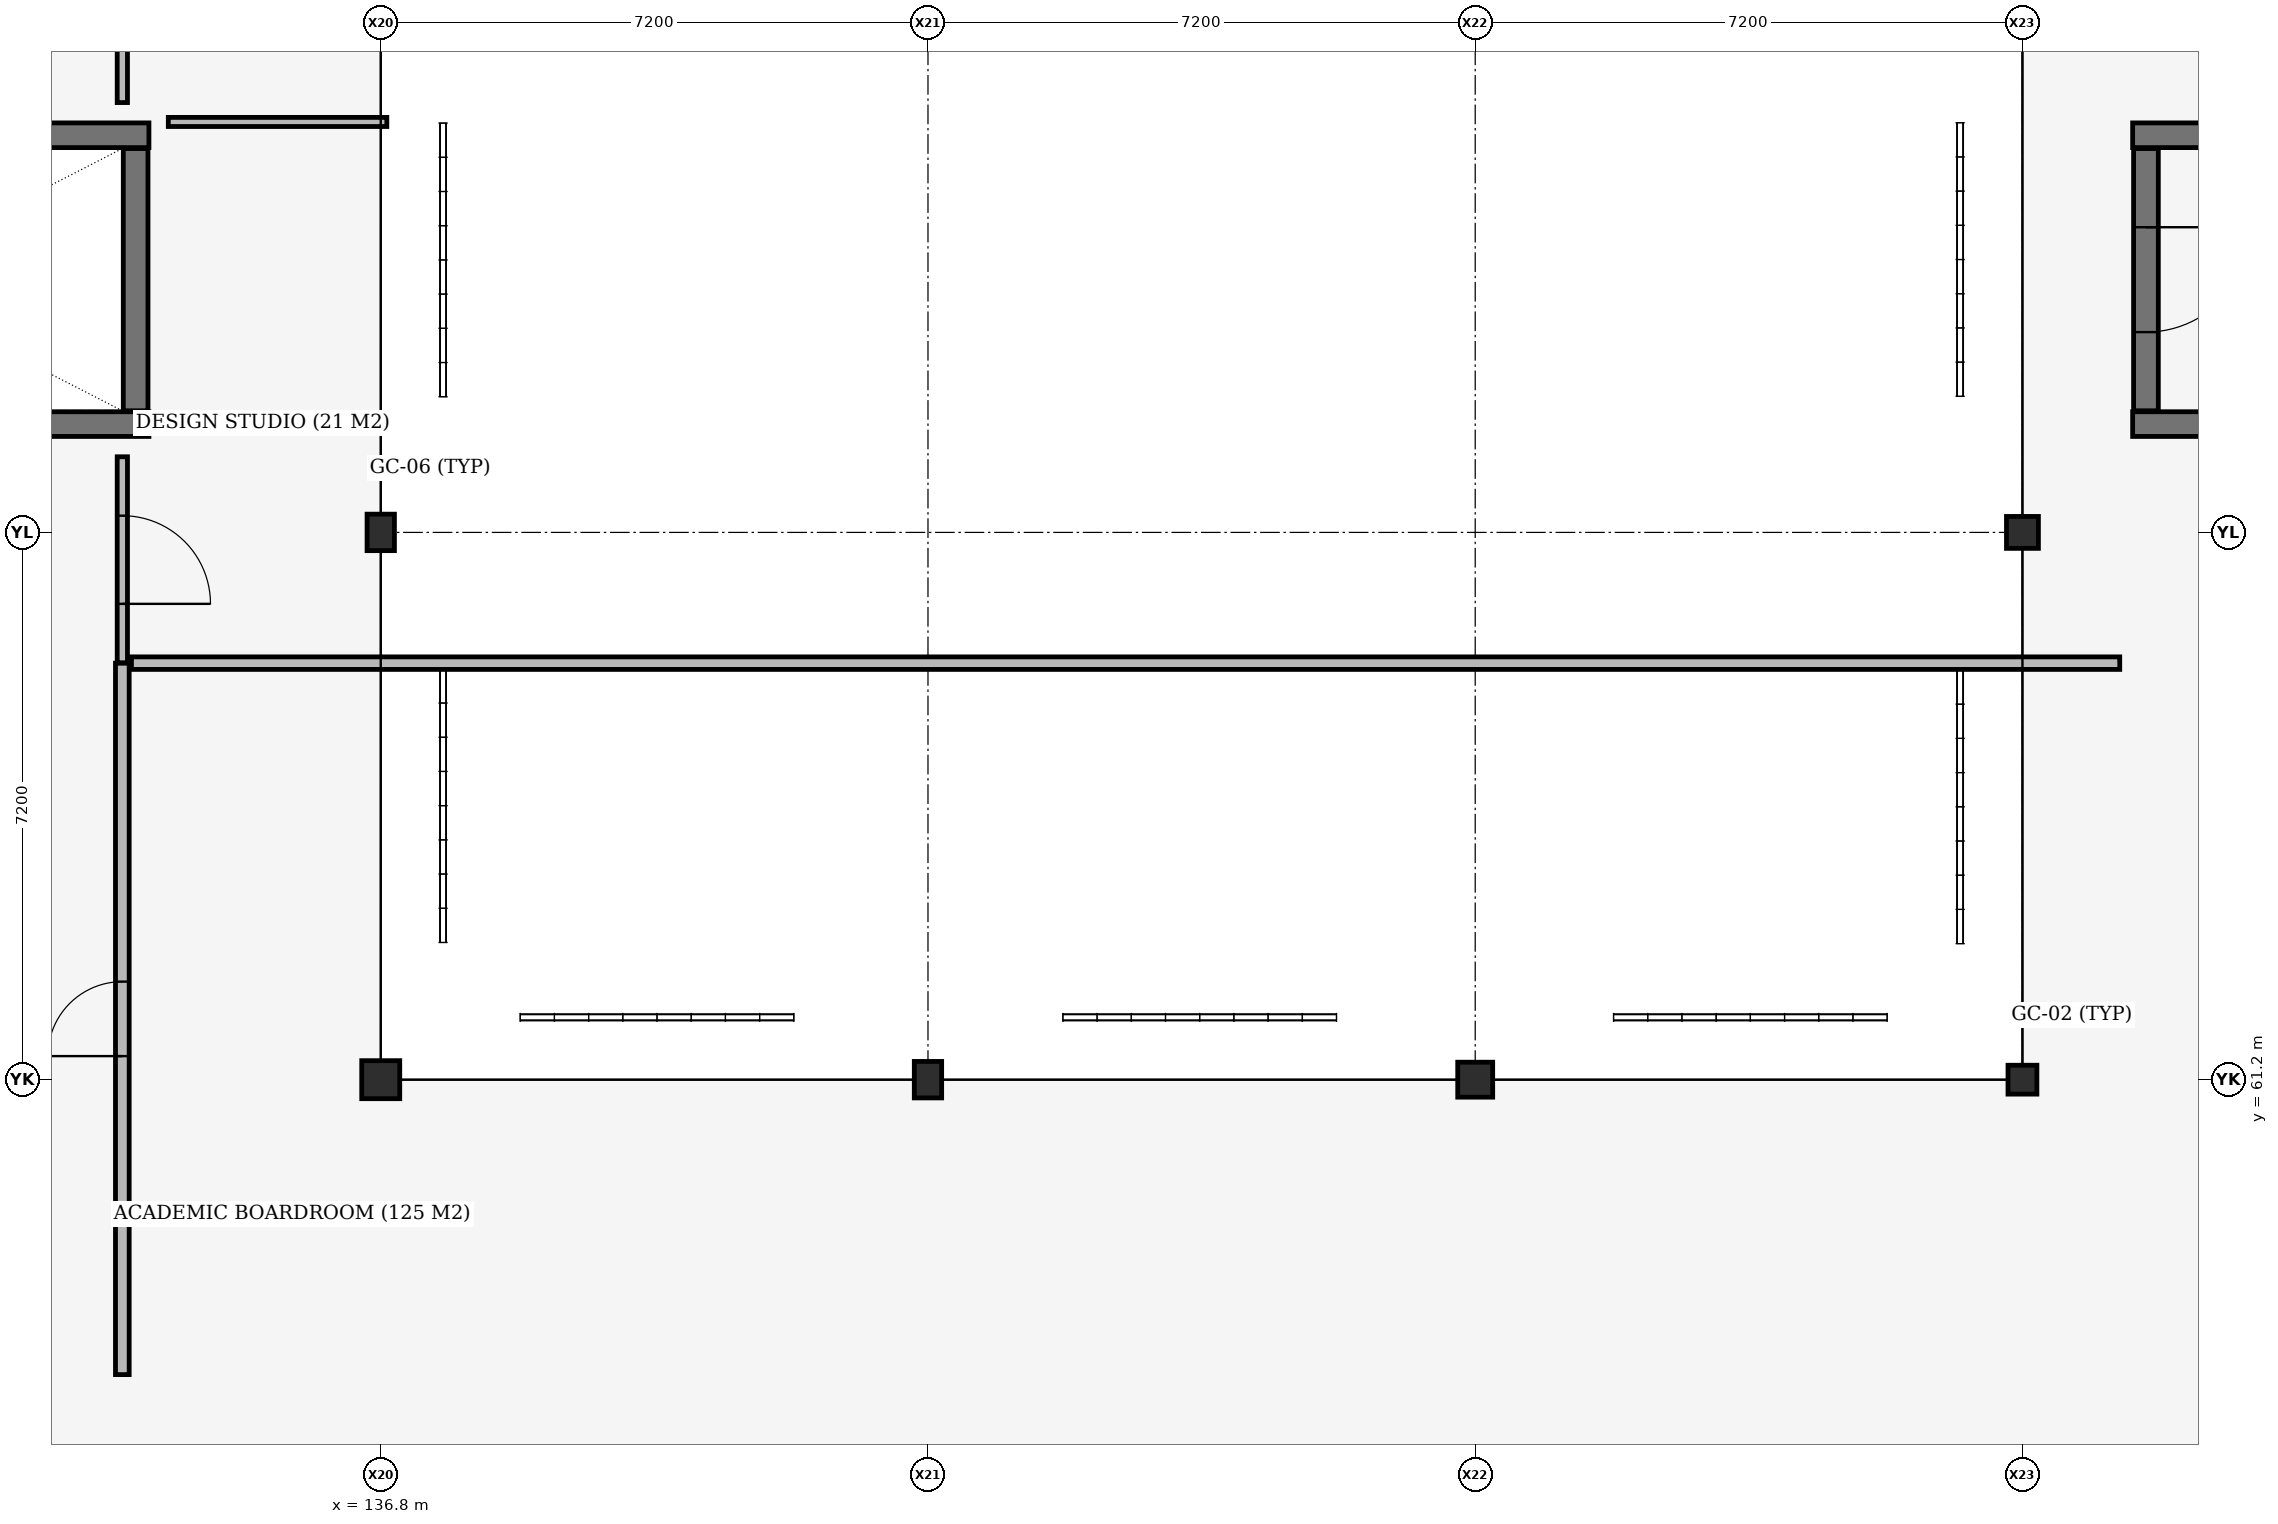
"""IFC4 building model, lengths in metres.
Left out: names, types, materials, properties, quantities, classifications, styles, units other than length and angle.
Written with IfcOpenShell. Run it as: python <this file> out.ifc"""

import sys

from ifc_helpers import new_model, si_unit, direction, frame, frame_2d, origin, origin_2d, place, context, subcontext, project, spatial, rectangle, extrude, element, fill, save


model = new_model("IFC4")
c1 = context("Model", 3, precision=1e-05, world=origin(), true_north=direction((0.0, 1.0)))
c2 = subcontext(c1, "Body", "Model", "MODEL_VIEW")
j1 = project(units=[si_unit("LENGTHUNIT", "METRE"), si_unit("PLANEANGLEUNIT", "RADIAN")], contexts=[c1])
p1 = place(None, origin())
s1 = spatial("IfcSite", under=j1, at=p1, CompositionType="ELEMENT")
p2 = place(p1, origin())
s2 = spatial("IfcBuilding", under=s1, at=p2, CompositionType="ELEMENT")
p3 = place(p2, frame((0.0, 0.0, 13.8)))
s3 = spatial("IfcBuildingStorey", under=s2, at=p3, CompositionType="ELEMENT", Elevation=13.8)
p4 = place(p3, frame((136.8, 61.2, 0.0), z_axis=(0.0, 0.0, 1.0), x_axis=(1.0, 0.0, 0.0)))
e1 = element("IfcColumn", 1, at=p4, inside=s3, PredefinedType="COLUMN", context=c2, shape_type="SweptSolid", body=[
    extrude(rectangle(XDim=0.5, YDim=0.5, at=origin_2d()), origin(), (0.0, 0.0, 1.0), 3.96),
])
p5 = place(p3, frame((136.8, 68.4, 0.0), z_axis=(0.0, 0.0, 1.0), x_axis=(1.0, 0.0, 0.0)))
e2 = element("IfcColumn", 2, at=p5, inside=s3, PredefinedType="COLUMN", context=c2, shape_type="SweptSolid", body=[
    extrude(rectangle(XDim=0.36, YDim=0.48, at=origin_2d()), origin(), (0.0, 0.0, 1.0), 3.935),
])
p6 = place(p3, frame((144.0, 61.2, 0.0), z_axis=(0.0, 0.0, 1.0), x_axis=(1.0, 0.0, 0.0)))
e3 = element("IfcColumn", 3, at=p6, inside=s3, PredefinedType="COLUMN", context=c2, shape_type="SweptSolid", body=[
    extrude(rectangle(XDim=0.36, YDim=0.48, at=origin_2d()), origin(), (0.0, 0.0, 1.0), 3.96),
])
p7 = place(p3, frame((151.2, 61.2, 0.0), z_axis=(0.0, 0.0, 1.0), x_axis=(1.0, 0.0, 0.0)))
e4 = element("IfcColumn", 4, at=p7, inside=s3, PredefinedType="COLUMN", context=c2, shape_type="SweptSolid", body=[
    extrude(rectangle(XDim=0.46, YDim=0.46, at=origin_2d()), origin(), (0.0, 0.0, 1.0), 3.96),
])
p8 = place(p3, frame((158.4, 61.2, 0.0), z_axis=(0.0, 0.0, 1.0), x_axis=(1.0, 0.0, 0.0)))
e5 = element("IfcColumn", 5, at=p8, inside=s3, PredefinedType="COLUMN", context=c2, shape_type="SweptSolid", body=[
    extrude(rectangle(XDim=0.38, YDim=0.38, at=origin_2d()), origin(), (0.0, 0.0, 1.0), 3.96),
])
p9 = place(p3, frame((158.4, 68.4, 0.0), z_axis=(0.0, 0.0, 1.0), x_axis=(1.0, 0.0, 0.0)))
e6 = element("IfcColumn", 6, at=p9, inside=s3, PredefinedType="COLUMN", context=c2, shape_type="SweptSolid", body=[
    extrude(rectangle(XDim=0.42, YDim=0.42, at=origin_2d()), origin(), (0.0, 0.0, 1.0), 3.935),
])
for number, where, z_axis, x_axis in (
    (7, (124.65, 69.825, 0.0), (0.0, 0.0, 1.0), (1.0, 0.0, 0.0)),
    (8, (133.75, 73.625, 0.0), (0.0, 0.0, 1.0), (-1.0, 0.0, 0.0)),
):
    element("IfcWall", number, at=place(p3, frame(where, z_axis=z_axis, x_axis=x_axis)), inside=s3, PredefinedType="SHEAR", context=c2, shape_type="SweptSolid", body=[
        extrude(rectangle(XDim=9.1, YDim=0.325, at=frame_2d((4.55, 0.0))), origin(), (0.0, 0.0, 1.0), 3.935),
    ])
p10 = place(p3, frame((133.575, 70.0, 0.0), z_axis=(0.0, 0.0, 1.0), x_axis=(0.0, 1.0, 0.0)))
e9 = element("IfcWall", 9, at=p10, inside=s3, PredefinedType="SHEAR", context=c2, shape_type="SweptSolid", body=[
    extrude(rectangle(XDim=3.45, YDim=0.325, at=frame_2d((1.725, 0.0))), origin(), (0.0, 0.0, 1.0), 3.935),
])
for number, where, z_axis, x_axis in (
    (10, (159.85, 69.825, 0.0), (0.0, 0.0, 1.0), (1.0, 0.0, 0.0)),
    (11, (168.95, 73.625, 0.0), (0.0, 0.0, 1.0), (-1.0, 0.0, 0.0)),
):
    element("IfcWall", number, at=place(p3, frame(where, z_axis=z_axis, x_axis=x_axis)), inside=s3, PredefinedType="SHEAR", context=c2, shape_type="SweptSolid", body=[
        extrude(rectangle(XDim=9.1, YDim=0.325, at=frame_2d((4.55, 0.0))), origin(), (0.0, 0.0, 1.0), 3.935),
    ])
p11 = place(p3, frame((160.025, 73.45, 0.0), z_axis=(0.0, 0.0, 1.0), x_axis=(0.0, -1.0, 0.0)))
e12 = element("IfcWall", 12, at=p11, inside=s3, PredefinedType="SHEAR", context=c2, shape_type="SweptSolid", body=[
    extrude(rectangle(XDim=3.45, YDim=0.325, at=frame_2d((1.725, 0.0))), origin(), (0.0, 0.0, 1.0), 3.935),
])
p12 = place(p11, frame((1.035, 0.0, 0.0)))
e13 = element("IfcOpeningElement", 13, at=p12, cuts=e12, PredefinedType="OPENING", context=c2, shape_type="SweptSolid", body=[
    extrude(rectangle(XDim=1.38, YDim=2.2, at=frame_2d((0.69, 1.1))), frame((0.0, 0.172, 0.0), z_axis=(0.0, -1.0, 0.0), x_axis=(1.0, 0.0, 0.0)), (0.0, 0.0, 1.0), 0.345),
])
p13 = place(p3, frame((133.4, 57.32, 0.0), z_axis=(0.0, 0.0, 1.0), x_axis=(0.0, 1.0, 0.0)))
e14 = element("IfcWall", 14, at=p13, inside=s3, PredefinedType="PARTITIONING", context=c2, shape_type="SweptSolid", body=[
    extrude(rectangle(XDim=9.36, YDim=0.18, at=frame_2d((4.68, 0.0))), origin(), (0.0, 0.0, 1.0), 3.935),
])
p14 = place(p13, frame((4.19, 0.0, 0.0)))
e15 = element("IfcOpeningElement", 15, at=p14, cuts=e14, PredefinedType="OPENING", context=c2, shape_type="SweptSolid", body=[
    extrude(rectangle(XDim=0.98, YDim=2.18, at=frame_2d((0.49, 1.09))), frame((0.0, 0.1, 0.0), z_axis=(0.0, -1.0, 0.0), x_axis=(1.0, 0.0, 0.0)), (0.0, 0.0, 1.0), 0.2),
])
p15 = place(p3, frame((133.52, 66.68, 0.0), z_axis=(0.0, 0.0, 1.0), x_axis=(1.0, 0.0, 0.0)))
e16 = element("IfcWall", 16, at=p15, inside=s3, PredefinedType="PARTITIONING", context=c2, shape_type="SweptSolid", body=[
    extrude(rectangle(XDim=26.16, YDim=0.165, at=frame_2d((13.08, 0.0))), origin(), (0.0, 0.0, 1.0), 3.935),
])
p16 = place(p3, frame((133.4, 66.685, 0.0), z_axis=(0.0, 0.0, 1.0), x_axis=(0.0, 1.0, 0.0)))
e17 = element("IfcWall", 17, at=p16, inside=s3, PredefinedType="PARTITIONING", context=c2, shape_type="SweptSolid", body=[
    extrude(rectangle(XDim=2.71, YDim=0.135, at=frame_2d((1.355, 0.0))), origin(), (0.0, 0.0, 1.0), 3.255),
])
p17 = place(p16, frame((0.775, 0.0, 0.0)))
e18 = element("IfcOpeningElement", 18, at=p17, cuts=e17, PredefinedType="OPENING", context=c2, shape_type="SweptSolid", body=[
    extrude(rectangle(XDim=1.16, YDim=2.2, at=frame_2d((0.58, 1.1))), frame((0.0, 0.077, 0.0), z_axis=(0.0, -1.0, 0.0), x_axis=(1.0, 0.0, 0.0)), (0.0, 0.0, 1.0), 0.155),
])
p18 = place(p3, frame((134.005, 73.8, 0.0), z_axis=(0.0, 0.0, 1.0), x_axis=(1.0, 0.0, 0.0)))
e19 = element("IfcWall", 19, at=p18, inside=s3, PredefinedType="PARTITIONING", context=c2, shape_type="SweptSolid", body=[
    extrude(rectangle(XDim=2.875, YDim=0.12, at=frame_2d((1.438, 0.0))), origin(), (0.0, 0.0, 1.0), 3.195),
])
p19 = place(p3, frame((133.4, 74.055, 0.0), z_axis=(0.0, 0.0, 1.0), x_axis=(0.0, 1.0, 0.0)))
e20 = element("IfcWall", 20, at=p19, inside=s3, PredefinedType="PARTITIONING", context=c2, shape_type="SweptSolid", body=[
    extrude(rectangle(XDim=8.645, YDim=0.135, at=frame_2d((4.323, 0.0))), origin(), (0.0, 0.0, 1.0), 3.295),
])
p20 = place(p19, frame((3.748, 0.0, 0.0)))
e21 = element("IfcOpeningElement", 21, at=p20, cuts=e20, PredefinedType="OPENING", context=c2, shape_type="SweptSolid", body=[
    extrude(rectangle(XDim=1.15, YDim=2.2, at=frame_2d((0.575, 1.1))), frame((0.0, 0.077, 0.0), z_axis=(0.0, -1.0, 0.0), x_axis=(1.0, 0.0, 0.0)), (0.0, 0.0, 1.0), 0.155),
])
p21 = place(p12, origin())
e22 = element("IfcDoor", 22, at=p21, inside=s3, OperationType="DOUBLE_DOOR_SINGLE_SWING", PredefinedType="DOOR", context=c2, shape_type="SweptSolid", body=[
    extrude(rectangle(XDim=1.38, YDim=2.2, at=frame_2d((0.69, 1.1))), frame((0.0, 0.025, 0.0), z_axis=(0.0, -1.0, 0.0), x_axis=(1.0, 0.0, 0.0)), (0.0, 0.0, 1.0), 0.05),
])
fill(e13, e22)
p22 = place(p14, origin())
e23 = element("IfcDoor", 23, at=p22, inside=s3, OperationType="SINGLE_SWING_LEFT", PredefinedType="DOOR", context=c2, shape_type="SweptSolid", body=[
    extrude(rectangle(XDim=0.98, YDim=2.18, at=frame_2d((0.49, 1.09))), frame((0.0, 0.025, 0.0), z_axis=(0.0, -1.0, 0.0), x_axis=(1.0, 0.0, 0.0)), (0.0, 0.0, 1.0), 0.05),
])
fill(e15, e23)
p23 = place(p17, origin())
e24 = element("IfcDoor", 24, at=p23, inside=s3, OperationType="SINGLE_SWING_RIGHT", PredefinedType="DOOR", context=c2, shape_type="SweptSolid", body=[
    extrude(rectangle(XDim=1.16, YDim=2.2, at=frame_2d((0.58, 1.1))), frame((0.0, 0.025, 0.0), z_axis=(0.0, -1.0, 0.0), x_axis=(1.0, 0.0, 0.0)), (0.0, 0.0, 1.0), 0.05),
])
fill(e18, e24)
save(model, sys.argv[1])
